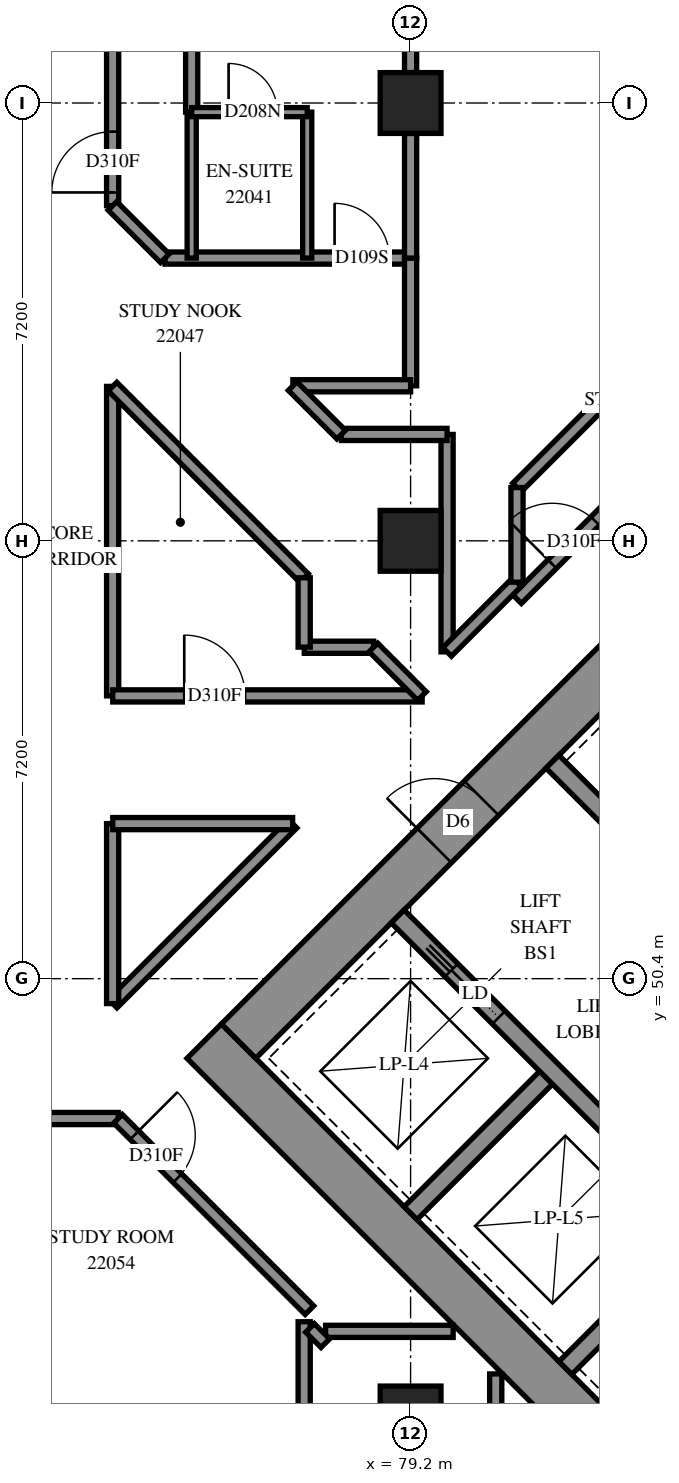
"""IFC4 building model, lengths in metres.
Left out: names, types, materials, properties, quantities, classifications, styles, units other than length and angle.
Written with IfcOpenShell. Run it as: python <this file> out.ifc"""

import sys

from ifc_helpers import new_model, si_unit, direction, frame, frame_2d, origin, origin_2d, place, context, subcontext, project, spatial, rectangle, extrude, element, fill, save


model = new_model("IFC4")
c1 = context("Model", 3, precision=1e-05, world=origin(), true_north=direction((0.0, 1.0)))
c2 = subcontext(c1, "Body", "Model", "MODEL_VIEW")
j1 = project(units=[si_unit("LENGTHUNIT", "METRE"), si_unit("PLANEANGLEUNIT", "RADIAN")], contexts=[c1])
p1 = place(None, origin())
s1 = spatial("IfcSite", under=j1, at=p1, CompositionType="ELEMENT")
p2 = place(p1, origin())
s2 = spatial("IfcBuilding", under=s1, at=p2, CompositionType="ELEMENT")
p3 = place(p2, frame((0.0, 0.0, 84.6)))
s3 = spatial("IfcBuildingStorey", under=s2, at=p3, CompositionType="ELEMENT", Elevation=84.6)
for number, where, z_axis, x_axis in (
    (1, (79.2, 43.2, 0.0), (0.0, 0.0, 1.0), (1.0, 0.0, 0.0)),
    (2, (79.2, 57.6, 0.0), (0.0, 0.0, 1.0), (1.0, 0.0, 0.0)),
    (3, (79.2, 64.8, 0.0), (0.0, 0.0, 1.0), (1.0, 0.0, 0.0)),
):
    element("IfcColumn", number, at=place(p3, frame(where, z_axis=z_axis, x_axis=x_axis)), inside=s3, PredefinedType="COLUMN", context=c2, shape_type="SweptSolid", body=[
        extrude(rectangle(XDim=1.0, YDim=1.0, at=origin_2d()), origin(), (0.0, 0.0, 1.0), 3.1),
    ])
p4 = place(p3, frame((75.806, 49.373, -0.3), z_axis=(0.0, 0.0, 1.0), x_axis=(0.7071067812, -0.7071067812, 0.0)))
e4 = element("IfcWall", 4, at=p4, inside=s3, PredefinedType="SHEAR", context=c2, shape_type="SweptSolid", body=[
    extrude(rectangle(XDim=16.0, YDim=0.8, at=frame_2d((8.0, 0.0))), origin(), (0.0, 0.0, 1.0), 2.7),
])
p5 = place(p3, frame((76.372, 49.373, -0.3), z_axis=(0.0, 0.0, 1.0), x_axis=(0.7071067812, 0.7071067812, 0.0)))
e5 = element("IfcWall", 5, at=p5, inside=s3, PredefinedType="SHEAR", context=c2, shape_type="SweptSolid", body=[
    extrude(rectangle(XDim=14.4, YDim=0.8, at=frame_2d((7.2, 0.0))), origin(), (0.0, 0.0, 1.0), 2.7),
])
p6 = place(p5, frame((4.55, 0.0, 0.3)))
e6 = element("IfcOpeningElement", 6, at=p6, cuts=e5, PredefinedType="OPENING", context=c2, shape_type="SweptSolid", body=[
    extrude(rectangle(XDim=1.1, YDim=2.1, at=frame_2d((0.55, 1.05))), frame((0.0, 0.41, 0.0), z_axis=(0.0, -1.0, 0.0), x_axis=(1.0, 0.0, 0.0)), (0.0, 0.0, 1.0), 0.82),
])
p7 = place(p5, frame((11.35, 0.0, 0.3)))
e7 = element("IfcOpeningElement", 7, at=p7, cuts=e5, PredefinedType="OPENING", context=c2, shape_type="SweptSolid", body=[
    extrude(rectangle(XDim=1.1, YDim=2.1, at=frame_2d((0.55, 1.05))), frame((0.0, 0.41, 0.0), z_axis=(0.0, -1.0, 0.0), x_axis=(1.0, 0.0, 0.0)), (0.0, 0.0, 1.0), 0.82),
])
p8 = place(p3, frame((79.2, 46.544, 0.0), z_axis=(0.0, 0.0, 1.0), x_axis=(0.7071219326, 0.7070916295, 0.0)))
e8 = element("IfcWall", 8, at=p8, inside=s3, PredefinedType="SOLIDWALL", context=c2, shape_type="SweptSolid", body=[
    extrude(rectangle(XDim=3.3, YDim=0.3, at=frame_2d((1.65, 0.0))), origin(), (0.0, 0.0, 1.0), 3.1),
])
p9 = place(p3, frame((81.746, 43.999, 0.0), z_axis=(0.0, 0.0, 1.0), x_axis=(0.7071067812, 0.7071067812, 0.0)))
e9 = element("IfcWall", 9, at=p9, inside=s3, PredefinedType="SOLIDWALL", context=c2, shape_type="SweptSolid", body=[
    extrude(rectangle(XDim=3.3, YDim=0.3, at=frame_2d((1.65, 0.0))), origin(), (0.0, 0.0, 1.0), 3.1),
])
p10 = place(p3, frame((78.988, 51.423, 0.0), z_axis=(0.0, 0.0, 1.0), x_axis=(0.7071067812, -0.7071067812, 0.0)))
e10 = element("IfcWall", 10, at=p10, inside=s3, PredefinedType="SOLIDWALL", context=c2, shape_type="SweptSolid", body=[
    extrude(rectangle(XDim=14.4, YDim=0.3, at=frame_2d((7.2, 0.0))), origin(), (0.0, 0.0, 1.0), 3.1),
])
p11 = place(p10, frame((1.25, 0.0, 0.0)))
e11 = element("IfcOpeningElement", 11, at=p11, cuts=e10, PredefinedType="OPENING", context=c2, shape_type="SweptSolid", body=[
    extrude(rectangle(XDim=1.1, YDim=2.1, at=frame_2d((0.55, 1.05))), frame((0.0, 0.16, 0.0), z_axis=(0.0, -1.0, 0.0), x_axis=(1.0, 0.0, 0.0)), (0.0, 0.0, 1.0), 0.32),
])
p12 = place(p10, frame((4.85, 0.0, 0.0)))
e12 = element("IfcOpeningElement", 12, at=p12, cuts=e10, PredefinedType="OPENING", context=c2, shape_type="SweptSolid", body=[
    extrude(rectangle(XDim=1.1, YDim=2.1, at=frame_2d((0.55, 1.05))), frame((0.0, 0.16, 0.0), z_axis=(0.0, -1.0, 0.0), x_axis=(1.0, 0.0, 0.0)), (0.0, 0.0, 1.0), 0.32),
])
p13 = place(p10, frame((8.45, 0.0, 0.0)))
e13 = element("IfcOpeningElement", 13, at=p13, cuts=e10, PredefinedType="OPENING", context=c2, shape_type="SweptSolid", body=[
    extrude(rectangle(XDim=1.1, YDim=2.1, at=frame_2d((0.55, 1.05))), frame((0.0, 0.16, 0.0), z_axis=(0.0, -1.0, 0.0), x_axis=(1.0, 0.0, 0.0)), (0.0, 0.0, 1.0), 0.32),
])
p14 = place(p10, frame((12.05, 0.0, 0.0)))
e14 = element("IfcOpeningElement", 14, at=p14, cuts=e10, PredefinedType="OPENING", context=c2, shape_type="SweptSolid", body=[
    extrude(rectangle(XDim=1.1, YDim=2.1, at=frame_2d((0.55, 1.05))), frame((0.0, 0.16, 0.0), z_axis=(0.0, -1.0, 0.0), x_axis=(1.0, 0.0, 0.0)), (0.0, 0.0, 1.0), 0.32),
])
p15 = place(p3, frame((81.534, 53.969, 0.0), z_axis=(0.0, 0.0, 1.0), x_axis=(0.707103309, -0.7071102534, 0.0)))
e15 = element("IfcWall", 15, at=p15, inside=s3, PredefinedType="SOLIDWALL", context=c2, shape_type="SweptSolid", body=[
    extrude(rectangle(XDim=14.4, YDim=0.3, at=frame_2d((7.2, 0.0))), origin(), (0.0, 0.0, 1.0), 3.1),
])
p16 = place(p15, frame((12.05, 0.0, 0.0)))
e16 = element("IfcOpeningElement", 16, at=p16, cuts=e15, PredefinedType="OPENING", context=c2, shape_type="SweptSolid", body=[
    extrude(rectangle(XDim=1.1, YDim=2.1, at=frame_2d((0.55, 1.05))), frame((0.0, 0.16, 0.0), z_axis=(0.0, -1.0, 0.0), x_axis=(1.0, 0.0, 0.0)), (0.0, 0.0, 1.0), 0.32),
])
p17 = place(p3, frame((55.3, 48.1, 0.0), z_axis=(0.0, 0.0, 1.0), x_axis=(1.0, 0.0, 0.0)))
e17 = element("IfcWall", 17, at=p17, inside=s3, PredefinedType="PARTITIONING", context=c2, shape_type="SweptSolid", body=[
    extrude(rectangle(XDim=19.092, YDim=0.2, at=frame_2d((9.546, 0.0))), origin(), (0.0, 0.0, 1.0), 3.1),
])
p18 = place(p17, frame((6.199, 0.0, 0.0)))
e18 = element("IfcOpeningElement", 18, at=p18, cuts=e17, PredefinedType="OPENING", context=c2, shape_type="SweptSolid", body=[
    extrude(rectangle(XDim=0.9, YDim=2.1, at=frame_2d((0.45, 1.05))), frame((0.0, 0.11, 0.0), z_axis=(0.0, -1.0, 0.0), x_axis=(1.0, 0.0, 0.0)), (0.0, 0.0, 1.0), 0.22),
])
p19 = place(p17, frame((13.363, 0.0, 0.0)))
e19 = element("IfcOpeningElement", 19, at=p19, cuts=e17, PredefinedType="OPENING", context=c2, shape_type="SweptSolid", body=[
    extrude(rectangle(XDim=1.0, YDim=2.1, at=frame_2d((0.5, 1.05))), frame((0.0, 0.11, 0.0), z_axis=(0.0, -1.0, 0.0), x_axis=(1.0, 0.0, 0.0)), (0.0, 0.0, 1.0), 0.22),
])
p20 = place(p3, frame((80.949, 58.477, 0.0), z_axis=(0.0, 0.0, 1.0), x_axis=(0.7071122668, 0.7071012955, 0.0)))
e20 = element("IfcWall", 20, at=p20, inside=s3, PredefinedType="PARTITIONING", context=c2, shape_type="SweptSolid", body=[
    extrude(rectangle(XDim=9.115, YDim=0.2, at=frame_2d((4.557, 0.0))), origin(), (0.0, 0.0, 1.0), 3.1),
])
p21 = place(p3, frame((80.951, 56.641, 0.0), z_axis=(0.0, 0.0, 1.0), x_axis=(0.7071067812, 0.7071067812, 0.0)))
e21 = element("IfcWall", 21, at=p21, inside=s3, PredefinedType="PARTITIONING", context=c2, shape_type="SweptSolid", body=[
    extrude(rectangle(XDim=8.321, YDim=0.2, at=frame_2d((4.161, 0.0))), origin(), (0.0, 0.0, 1.0), 3.1),
])
p22 = place(p21, frame((0.816, 0.0, 0.0)))
e22 = element("IfcOpeningElement", 22, at=p22, cuts=e21, PredefinedType="OPENING", context=c2, shape_type="SweptSolid", body=[
    extrude(rectangle(XDim=1.0, YDim=2.1, at=frame_2d((0.5, 1.05))), frame((0.0, 0.11, 0.0), z_axis=(0.0, -1.0, 0.0), x_axis=(1.0, 0.0, 0.0)), (0.0, 0.0, 1.0), 0.22),
])
p23 = place(p3, frame((75.6, 64.65, 0.0), z_axis=(0.0, 0.0, 1.0), x_axis=(0.0, 1.0, 0.0)))
e23 = element("IfcWall", 23, at=p23, inside=s3, PredefinedType="PARTITIONING", context=c2, shape_type="SweptSolid", body=[
    extrude(rectangle(XDim=8.058, YDim=0.2, at=frame_2d((4.029, 0.0))), origin(), (0.0, 0.0, 1.0), 3.1),
])
p24 = place(p3, frame((79.2, 65.3, 0.0), z_axis=(0.0, 0.0, 1.0), x_axis=(0.0, 1.0, 0.0)))
e24 = element("IfcWall", 24, at=p24, inside=s3, PredefinedType="PARTITIONING", context=c2, shape_type="SweptSolid", body=[
    extrude(rectangle(XDim=6.2, YDim=0.2, at=frame_2d((3.1, 0.0))), origin(), (0.0, 0.0, 1.0), 3.1),
])
p25 = place(p3, frame((74.3, 55.05, 0.0), z_axis=(0.0, 0.0, 1.0), x_axis=(0.0, 1.0, 0.0)))
e25 = element("IfcWall", 25, at=p25, inside=s3, PredefinedType="PARTITIONING", context=c2, shape_type="SweptSolid", body=[
    extrude(rectangle(XDim=5.09, YDim=0.2, at=frame_2d((2.545, 0.0))), origin(), (0.0, 0.0, 1.0), 3.1),
])
p26 = place(p3, frame((74.302, 55.05, 0.0), z_axis=(0.0, 0.0, 1.0), x_axis=(1.0, 0.0, 0.0)))
e26 = element("IfcWall", 26, at=p26, inside=s3, PredefinedType="PARTITIONING", context=c2, shape_type="SweptSolid", body=[
    extrude(rectangle(XDim=5.088, YDim=0.2, at=frame_2d((2.544, 0.0))), origin(), (0.0, 0.0, 1.0), 3.1),
])
p27 = place(p26, frame((1.176, 0.0, 0.0)))
e27 = element("IfcOpeningElement", 27, at=p27, cuts=e26, PredefinedType="OPENING", context=c2, shape_type="SweptSolid", body=[
    extrude(rectangle(XDim=1.0, YDim=2.1, at=frame_2d((0.5, 1.05))), frame((0.0, 0.11, 0.0), z_axis=(0.0, -1.0, 0.0), x_axis=(1.0, 0.0, 0.0)), (0.0, 0.0, 1.0), 0.22),
])
p28 = place(p3, frame((74.388, 48.096, 0.0), z_axis=(0.0, 0.0, 1.0), x_axis=(0.7071067812, -0.7071067812, 0.0)))
e28 = element("IfcWall", 28, at=p28, inside=s3, PredefinedType="PARTITIONING", context=c2, shape_type="SweptSolid", body=[
    extrude(rectangle(XDim=4.452, YDim=0.2, at=frame_2d((2.226, 0.0))), origin(), (0.0, 0.0, 1.0), 3.1),
])
p29 = place(p28, frame((0.382, 0.0, 0.0)))
e29 = element("IfcOpeningElement", 29, at=p29, cuts=e28, PredefinedType="OPENING", context=c2, shape_type="SweptSolid", body=[
    extrude(rectangle(XDim=1.0, YDim=2.1, at=frame_2d((0.5, 1.05))), frame((0.0, 0.11, 0.0), z_axis=(0.0, -1.0, 0.0), x_axis=(1.0, 0.0, 0.0)), (0.0, 0.0, 1.0), 0.22),
])
p30 = place(p3, frame((74.299, 60.137, 0.0), z_axis=(0.0, 0.0, 1.0), x_axis=(0.7071067812, -0.7071067812, 0.0)))
e30 = element("IfcWall", 30, at=p30, inside=s3, PredefinedType="PARTITIONING", context=c2, shape_type="SweptSolid", body=[
    extrude(rectangle(XDim=4.452, YDim=0.2, at=frame_2d((2.226, 0.0))), origin(), (0.0, 0.0, 1.0), 3.1),
])
p31 = place(p3, frame((74.301, 49.991, 0.0), z_axis=(0.0, 0.0, 1.0), x_axis=(0.7071067812, 0.7071067812, 0.0)))
e31 = element("IfcWall", 31, at=p31, inside=s3, PredefinedType="PARTITIONING", context=c2, shape_type="SweptSolid", body=[
    extrude(rectangle(XDim=4.183, YDim=0.2, at=frame_2d((2.092, 0.0))), origin(), (0.0, 0.0, 1.0), 3.1),
])
p32 = place(p3, frame((75.162, 62.25, 0.0), z_axis=(0.0, 0.0, 1.0), x_axis=(1.0, 0.0, 0.0)))
e32 = element("IfcWall", 32, at=p32, inside=s3, PredefinedType="PARTITIONING", context=c2, shape_type="SweptSolid", body=[
    extrude(rectangle(XDim=4.038, YDim=0.2, at=frame_2d((2.019, 0.0))), origin(), (0.0, 0.0, 1.0), 3.1),
])
p33 = place(p32, frame((2.788, 0.0, 0.0)))
e33 = element("IfcOpeningElement", 33, at=p33, cuts=e32, PredefinedType="OPENING", context=c2, shape_type="SweptSolid", body=[
    extrude(rectangle(XDim=0.9, YDim=2.1, at=frame_2d((0.45, 1.05))), frame((0.0, 0.11, 0.0), z_axis=(0.0, -1.0, 0.0), x_axis=(1.0, 0.0, 0.0)), (0.0, 0.0, 1.0), 0.22),
])
p34 = place(p3, frame((74.3, 63.112, 0.0), z_axis=(0.0, 0.0, 1.0), x_axis=(0.0, 1.0, 0.0)))
e34 = element("IfcWall", 34, at=p34, inside=s3, PredefinedType="PARTITIONING", context=c2, shape_type="SweptSolid", body=[
    extrude(rectangle(XDim=3.988, YDim=0.2, at=frame_2d((1.994, 0.0))), origin(), (0.0, 0.0, 1.0), 3.1),
])
p35 = place(p34, frame((0.217, 0.0, 0.0)))
e35 = element("IfcOpeningElement", 35, at=p35, cuts=e34, PredefinedType="OPENING", context=c2, shape_type="SweptSolid", body=[
    extrude(rectangle(XDim=1.0, YDim=2.1, at=frame_2d((0.5, 1.05))), frame((0.0, 0.11, 0.0), z_axis=(0.0, -1.0, 0.0), x_axis=(1.0, 0.0, 0.0)), (0.0, 0.0, 1.0), 0.22),
])
p36 = place(p3, frame((79.8, 55.774, 0.0), z_axis=(0.0, 0.0, 1.0), x_axis=(0.0, 1.0, 0.0)))
e36 = element("IfcWall", 36, at=p36, inside=s3, PredefinedType="PARTITIONING", context=c2, shape_type="SweptSolid", body=[
    extrude(rectangle(XDim=3.576, YDim=0.2, at=frame_2d((1.788, 0.0))), origin(), (0.0, 0.0, 1.0), 3.1),
])
p37 = place(p3, frame((77.45, 41.173, 0.0), z_axis=(0.0, 0.0, 1.0), x_axis=(0.0, 1.0, 0.0)))
e37 = element("IfcWall", 37, at=p37, inside=s3, PredefinedType="PARTITIONING", context=c2, shape_type="SweptSolid", body=[
    extrude(rectangle(XDim=3.585, YDim=0.2, at=frame_2d((1.793, 0.0))), origin(), (0.0, 0.0, 1.0), 3.1),
])
p38 = place(p3, frame((74.3, 49.99, 0.0), z_axis=(0.0, 0.0, 1.0), x_axis=(0.0, 1.0, 0.0)))
e38 = element("IfcWall", 38, at=p38, inside=s3, PredefinedType="PARTITIONING", context=c2, shape_type="SweptSolid", body=[
    extrude(rectangle(XDim=2.96, YDim=0.2, at=frame_2d((1.48, 0.0))), origin(), (0.0, 0.0, 1.0), 3.1),
])
p39 = place(p3, frame((74.302, 52.95, 0.0), z_axis=(0.0, 0.0, 1.0), x_axis=(1.0, 0.0, 0.0)))
e39 = element("IfcWall", 39, at=p39, inside=s3, PredefinedType="PARTITIONING", context=c2, shape_type="SweptSolid", body=[
    extrude(rectangle(XDim=2.958, YDim=0.2, at=frame_2d((1.479, 0.0))), origin(), (0.0, 0.0, 1.0), 3.1),
])
for number, where, z_axis, x_axis in (
    (40, (75.6, 62.25, 0.0), (0.0, 0.0, 1.0), (0.0, 1.0, 0.0)),
    (41, (77.5, 62.25, 0.0), (0.0, 0.0, 1.0), (0.0, 1.0, 0.0)),
):
    element("IfcWall", number, at=place(p3, frame(where, z_axis=z_axis, x_axis=x_axis)), inside=s3, PredefinedType="PARTITIONING", context=c2, shape_type="SweptSolid", body=[
        extrude(rectangle(XDim=2.4, YDim=0.15, at=frame_2d((1.2, 0.0))), origin(), (0.0, 0.0, 1.0), 3.1),
    ])
p40 = place(p3, frame((79.2, 60.15, 0.0), z_axis=(0.0, 0.0, 1.0), x_axis=(0.0, 1.0, 0.0)))
e42 = element("IfcWall", 42, at=p40, inside=s3, PredefinedType="PARTITIONING", context=c2, shape_type="SweptSolid", body=[
    extrude(rectangle(XDim=2.1, YDim=0.2, at=frame_2d((1.05, 0.0))), origin(), (0.0, 0.0, 1.0), 3.1),
])
for number, where, z_axis, x_axis in (
    (43, (77.802, 44.6, 0.0), (0.0, 0.0, 1.0), (1.0, 0.0, 0.0)),
    (44, (80.6, 41.802, 0.0), (0.0, 0.0, 1.0), (0.0, 1.0, 0.0)),
):
    element("IfcWall", number, at=place(p3, frame(where, z_axis=z_axis, x_axis=x_axis)), inside=s3, PredefinedType="PARTITIONING", context=c2, shape_type="SweptSolid", body=[
        extrude(rectangle(XDim=2.098, YDim=0.2, at=frame_2d((1.049, 0.0))), origin(), (0.0, 0.0, 1.0), 3.1),
    ])
p41 = place(p3, frame((79.2, 62.25, 0.0), z_axis=(0.0, 0.0, 1.0), x_axis=(0.0, 1.0, 0.0)))
e45 = element("IfcWall", 45, at=p41, inside=s3, PredefinedType="PARTITIONING", context=c2, shape_type="SweptSolid", body=[
    extrude(rectangle(XDim=2.05, YDim=0.2, at=frame_2d((1.025, 0.0))), origin(), (0.0, 0.0, 1.0), 3.1),
])
p42 = place(p3, frame((77.264, 60.15, 0.0), z_axis=(0.0, 0.0, 1.0), x_axis=(1.0, 0.0, 0.0)))
e46 = element("IfcWall", 46, at=p42, inside=s3, PredefinedType="PARTITIONING", context=c2, shape_type="SweptSolid", body=[
    extrude(rectangle(XDim=1.936, YDim=0.2, at=frame_2d((0.968, 0.0))), origin(), (0.0, 0.0, 1.0), 3.1),
])
p43 = place(p3, frame((75.6, 64.65, 0.0), z_axis=(0.0, 0.0, 1.0), x_axis=(1.0, 0.0, 0.0)))
e47 = element("IfcWall", 47, at=p43, inside=s3, PredefinedType="PARTITIONING", context=c2, shape_type="SweptSolid", body=[
    extrude(rectangle(XDim=1.9, YDim=0.15, at=frame_2d((0.95, 0.0))), origin(), (0.0, 0.0, 1.0), 3.1),
])
p44 = place(p43, frame((0.607, 0.0, 0.0)))
e48 = element("IfcOpeningElement", 48, at=p44, cuts=e47, PredefinedType="OPENING", context=c2, shape_type="SweptSolid", body=[
    extrude(rectangle(XDim=0.8, YDim=2.1, at=frame_2d((0.4, 1.05))), frame((0.0, 0.085, 0.0), z_axis=(0.0, -1.0, 0.0), x_axis=(1.0, 0.0, 0.0)), (0.0, 0.0, 1.0), 0.17),
])
p45 = place(p3, frame((78.062, 59.35, 0.0), z_axis=(0.0, 0.0, 1.0), x_axis=(1.0, 0.0, 0.0)))
e49 = element("IfcWall", 49, at=p45, inside=s3, PredefinedType="PARTITIONING", context=c2, shape_type="SweptSolid", body=[
    extrude(rectangle(XDim=1.738, YDim=0.2, at=frame_2d((0.869, 0.0))), origin(), (0.0, 0.0, 1.0), 3.1),
])
p46 = place(p3, frame((79.801, 55.773, 0.0), z_axis=(0.0, 0.0, 1.0), x_axis=(0.7071067812, 0.7071067812, 0.0)))
e50 = element("IfcWall", 50, at=p46, inside=s3, PredefinedType="PARTITIONING", context=c2, shape_type="SweptSolid", body=[
    extrude(rectangle(XDim=1.623, YDim=0.2, at=frame_2d((0.812, 0.0))), origin(), (0.0, 0.0, 1.0), 3.1),
])
p47 = place(p3, frame((80.95, 56.92, 0.0), z_axis=(0.0, 0.0, 1.0), x_axis=(0.0, 1.0, 0.0)))
e51 = element("IfcWall", 51, at=p47, inside=s3, PredefinedType="PARTITIONING", context=c2, shape_type="SweptSolid", body=[
    extrude(rectangle(XDim=1.556, YDim=0.2, at=frame_2d((0.778, 0.0))), origin(), (0.0, 0.0, 1.0), 3.1),
])
p48 = place(p3, frame((74.296, 63.108, 0.0), z_axis=(0.0, 0.0, 1.0), x_axis=(0.7071067812, -0.7071067812, 0.0)))
e52 = element("IfcWall", 52, at=p48, inside=s3, PredefinedType="PARTITIONING", context=c2, shape_type="SweptSolid", body=[
    extrude(rectangle(XDim=1.219, YDim=0.2, at=frame_2d((0.61, 0.0))), origin(), (0.0, 0.0, 1.0), 3.1),
])
for number, where, z_axis, x_axis in (
    (53, (77.452, 55.85, 0.0), (0.0, 0.0, 1.0), (1.0, 0.0, 0.0)),
    (54, (77.45, 55.852, 0.0), (0.0, 0.0, 1.0), (0.0, 1.0, 0.0)),
):
    element("IfcWall", number, at=place(p3, frame(where, z_axis=z_axis, x_axis=x_axis)), inside=s3, PredefinedType="PARTITIONING", context=c2, shape_type="SweptSolid", body=[
        extrude(rectangle(XDim=1.14, YDim=0.2, at=frame_2d((0.57, 0.0))), origin(), (0.0, 0.0, 1.0), 3.1),
    ])
for number, where, z_axis, x_axis in (
    (55, (77.26, 60.145, 0.0), (0.0, 0.0, 1.0), (0.707, -0.707, 0.0)),
    (56, (78.589, 55.847, 0.0), (0.0, 0.0, 1.0), (0.707, -0.707, 0.0)),
):
    element("IfcWall", number, at=place(p3, frame(where, z_axis=z_axis, x_axis=x_axis)), inside=s3, PredefinedType="PARTITIONING", context=c2, shape_type="SweptSolid", body=[
        extrude(rectangle(XDim=1.129, YDim=0.2, at=frame_2d((0.564, 0.0))), origin(), (0.0, 0.0, 1.0), 3.1),
    ])
p49 = place(p3, frame((77.546, 44.656, 0.0), z_axis=(0.0, 0.0, 1.0), x_axis=(0.7071067812, -0.7071067812, 0.0)))
e57 = element("IfcWall", 57, at=p49, inside=s3, PredefinedType="PARTITIONING", context=c2, shape_type="SweptSolid", body=[
    extrude(rectangle(XDim=0.355, YDim=0.2, at=frame_2d((0.177, 0.0))), origin(), (0.0, 0.0, 1.0), 3.1),
])
p50 = place(p6, origin())
e58 = element("IfcDoor", 58, at=p50, inside=s3, OperationType="DOUBLE_DOOR_SINGLE_SWING", PredefinedType="DOOR", context=c2, shape_type="SweptSolid", body=[
    extrude(rectangle(XDim=1.1, YDim=2.1, at=frame_2d((0.55, 1.05))), frame((0.0, 0.025, 0.0), z_axis=(0.0, -1.0, 0.0), x_axis=(1.0, 0.0, 0.0)), (0.0, 0.0, 1.0), 0.05),
])
fill(e6, e58)
p51 = place(p11, origin())
e59 = element("IfcDoor", 59, at=p51, inside=s3, OperationType="SLIDING_TO_LEFT", PredefinedType="DOOR", context=c2, shape_type="SweptSolid", body=[
    extrude(rectangle(XDim=1.1, YDim=2.1, at=frame_2d((0.55, 1.05))), frame((0.0, 0.025, 0.0), z_axis=(0.0, -1.0, 0.0), x_axis=(1.0, 0.0, 0.0)), (0.0, 0.0, 1.0), 0.05),
])
fill(e11, e59)
p52 = place(p35, origin())
e60 = element("IfcDoor", 60, at=p52, inside=s3, OperationType="SINGLE_SWING_RIGHT", PredefinedType="DOOR", context=c2, shape_type="SweptSolid", body=[
    extrude(rectangle(XDim=1.0, YDim=2.1, at=frame_2d((0.5, 1.05))), frame((0.0, 0.025, 0.0), z_axis=(0.0, -1.0, 0.0), x_axis=(1.0, 0.0, 0.0)), (0.0, 0.0, 1.0), 0.05),
])
fill(e35, e60)
p53 = place(p33, origin())
e61 = element("IfcDoor", 61, at=p53, inside=s3, OperationType="SINGLE_SWING_LEFT", PredefinedType="DOOR", context=c2, shape_type="SweptSolid", body=[
    extrude(rectangle(XDim=0.9, YDim=2.1, at=frame_2d((0.45, 1.05))), frame((0.0, 0.025, 0.0), z_axis=(0.0, -1.0, 0.0), x_axis=(1.0, 0.0, 0.0)), (0.0, 0.0, 1.0), 0.05),
])
fill(e33, e61)
p54 = place(p44, origin())
e62 = element("IfcDoor", 62, at=p54, inside=s3, OperationType="SINGLE_SWING_RIGHT", PredefinedType="DOOR", context=c2, shape_type="SweptSolid", body=[
    extrude(rectangle(XDim=0.8, YDim=2.1, at=frame_2d((0.4, 1.05))), frame((0.0, 0.025, 0.0), z_axis=(0.0, -1.0, 0.0), x_axis=(1.0, 0.0, 0.0)), (0.0, 0.0, 1.0), 0.05),
])
fill(e48, e62)
p55 = place(p27, origin())
e63 = element("IfcDoor", 63, at=p55, inside=s3, OperationType="SINGLE_SWING_LEFT", PredefinedType="DOOR", context=c2, shape_type="SweptSolid", body=[
    extrude(rectangle(XDim=1.0, YDim=2.1, at=frame_2d((0.5, 1.05))), frame((0.0, 0.025, 0.0), z_axis=(0.0, -1.0, 0.0), x_axis=(1.0, 0.0, 0.0)), (0.0, 0.0, 1.0), 0.05),
])
fill(e27, e63)
p56 = place(p29, origin())
e64 = element("IfcDoor", 64, at=p56, inside=s3, OperationType="SINGLE_SWING_LEFT", PredefinedType="DOOR", context=c2, shape_type="SweptSolid", body=[
    extrude(rectangle(XDim=1.0, YDim=2.1, at=frame_2d((0.5, 1.05))), frame((0.0, 0.025, 0.0), z_axis=(0.0, -1.0, 0.0), x_axis=(1.0, 0.0, 0.0)), (0.0, 0.0, 1.0), 0.05),
])
fill(e29, e64)
p57 = place(p22, origin())
e65 = element("IfcDoor", 65, at=p57, inside=s3, OperationType="SINGLE_SWING_RIGHT", PredefinedType="DOOR", context=c2, shape_type="SweptSolid", body=[
    extrude(rectangle(XDim=1.0, YDim=2.1, at=frame_2d((0.5, 1.05))), frame((0.0, 0.025, 0.0), z_axis=(0.0, -1.0, 0.0), x_axis=(1.0, 0.0, 0.0)), (0.0, 0.0, 1.0), 0.05),
])
fill(e22, e65)
save(model, sys.argv[1])
